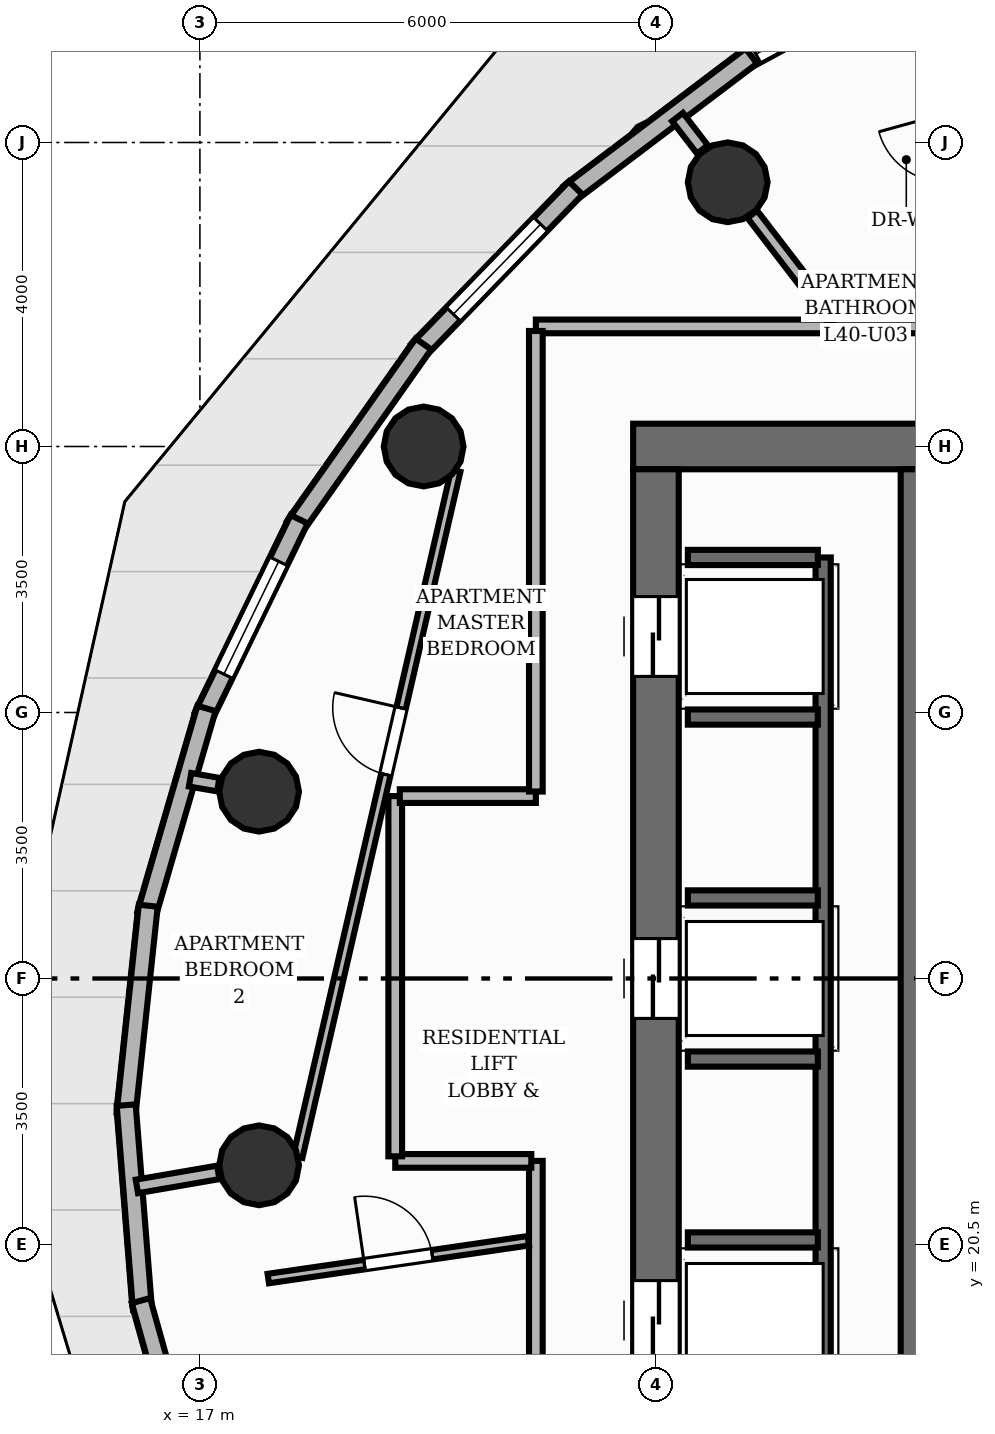
"""IFC4 building model, lengths in metres.
Left out: names, types, materials, properties, quantities, classifications, styles, units other than length and angle.
Written with IfcOpenShell. Run it as: python <this file> out.ifc"""

import sys

from ifc_helpers import new_model, si_unit, direction, frame, frame_2d, origin, origin_2d, place, context, subcontext, project, spatial, rectangle, circle, extrude, element, fill, save


model = new_model("IFC4")
c1 = context("Model", 3, precision=1e-05, world=origin(), true_north=direction((0.0, 1.0)))
c2 = subcontext(c1, "Body", "Model", "MODEL_VIEW")
j1 = project(units=[si_unit("LENGTHUNIT", "METRE"), si_unit("PLANEANGLEUNIT", "RADIAN")], contexts=[c1])
p1 = place(None, origin())
s1 = spatial("IfcSite", under=j1, at=p1, CompositionType="ELEMENT")
p2 = place(p1, origin())
s2 = spatial("IfcBuilding", under=s1, at=p2, CompositionType="ELEMENT")
p3 = place(p2, frame((0.0, 0.0, 136.16)))
s3 = spatial("IfcBuildingStorey", under=s2, at=p3, CompositionType="ELEMENT", Elevation=136.16)
p4 = place(p3, frame((22.7, 31.0, 0.0), z_axis=(0.0, 0.0, 1.0), x_axis=(1.0, 0.0, 0.0)))
e1 = element("IfcWall", 1, at=p4, inside=s3, PredefinedType="SHEAR", context=c2, shape_type="SweptSolid", body=[
    extrude(rectangle(XDim=15.1, YDim=0.6, at=frame_2d((7.55, 0.0))), origin(), (0.0, 0.0, 1.0), 3.2),
])
p5 = place(p4, frame((11.7, 0.0, 0.0)))
e2 = element("IfcOpeningElement", 2, at=p5, cuts=e1, PredefinedType="OPENING", context=c2, shape_type="SweptSolid", body=[
    extrude(rectangle(XDim=1.1, YDim=2.15, at=frame_2d((0.55, 1.075))), frame((0.0, 0.31, 0.0), z_axis=(0.0, -1.0, 0.0), x_axis=(1.0, 0.0, 0.0)), (0.0, 0.0, 1.0), 0.62),
])
p6 = place(p3, frame((23.0, 17.3, 0.0), z_axis=(0.0, 0.0, 1.0), x_axis=(0.0, 1.0, 0.0)))
e3 = element("IfcWall", 3, at=p6, inside=s3, PredefinedType="SHEAR", context=c2, shape_type="SweptSolid", body=[
    extrude(rectangle(XDim=13.4, YDim=0.6, at=frame_2d((6.7, 0.0))), origin(), (0.0, 0.0, 1.0), 3.2),
])
p7 = place(p6, frame((1.675, 0.0, 0.0)))
e4 = element("IfcOpeningElement", 4, at=p7, cuts=e3, PredefinedType="OPENING", context=c2, shape_type="SweptSolid", body=[
    extrude(rectangle(XDim=1.05, YDim=2.15, at=frame_2d((0.525, 1.075))), frame((0.0, 0.31, 0.0), z_axis=(0.0, -1.0, 0.0), x_axis=(1.0, 0.0, 0.0)), (0.0, 0.0, 1.0), 0.62),
])
p8 = place(p6, frame((6.175, 0.0, 0.0)))
e5 = element("IfcOpeningElement", 5, at=p8, cuts=e3, PredefinedType="OPENING", context=c2, shape_type="SweptSolid", body=[
    extrude(rectangle(XDim=1.05, YDim=2.15, at=frame_2d((0.525, 1.075))), frame((0.0, 0.31, 0.0), z_axis=(0.0, -1.0, 0.0), x_axis=(1.0, 0.0, 0.0)), (0.0, 0.0, 1.0), 0.62),
])
p9 = place(p6, frame((10.675, 0.0, 0.0)))
e6 = element("IfcOpeningElement", 6, at=p9, cuts=e3, PredefinedType="OPENING", context=c2, shape_type="SweptSolid", body=[
    extrude(rectangle(XDim=1.05, YDim=2.15, at=frame_2d((0.525, 1.075))), frame((0.0, 0.31, 0.0), z_axis=(0.0, -1.0, 0.0), x_axis=(1.0, 0.0, 0.0)), (0.0, 0.0, 1.0), 0.62),
])
p10 = place(p3, frame((26.5, 17.3, 0.0), z_axis=(0.0, 0.0, 1.0), x_axis=(0.0, 1.0, 0.0)))
e7 = element("IfcWall", 7, at=p10, inside=s3, PredefinedType="SHEAR", context=c2, shape_type="SweptSolid", body=[
    extrude(rectangle(XDim=13.4, YDim=0.56, at=frame_2d((6.7, 0.0))), origin(), (0.0, 0.0, 1.0), 3.2),
])
for number, where, z_axis, x_axis in (
    (8, (23.944, 34.477, 0.0), (0.0, 0.0, 1.0), (1.0, 0.0, 0.0)),
    (9, (19.944, 31.0, 0.0), (0.0, 0.0, 1.0), (1.0, 0.0, 0.0)),
    (10, (17.779, 26.458, 0.0), (0.0, 0.0, 1.0), (1.0, 0.0, 0.0)),
    (11, (17.779, 21.542, 0.0), (0.0, 0.0, 1.0), (1.0, 0.0, 0.0)),
):
    element("IfcColumn", number, at=place(p3, frame(where, z_axis=z_axis, x_axis=x_axis)), inside=s3, PredefinedType="COLUMN", context=c2, shape_type="SweptSolid", body=[
        extrude(circle(Radius=0.525, at=origin_2d()), origin(), (0.0, 0.0, 1.0), 3.2),
    ])
p11 = place(p3, frame((24.163, 36.079, 0.0), z_axis=(0.0, 0.0, 1.0), x_axis=(0.879567466611, 0.475774181393, 0.0)))
e12 = element("IfcWall", 12, at=p11, inside=s3, PredefinedType="SOLIDWALL", context=c2, shape_type="SweptSolid", body=[
    extrude(rectangle(XDim=2.998, YDim=0.25, at=frame_2d((1.499, 0.0))), origin(), (0.0, 0.0, 1.0), 2.96),
])
p12 = place(p11, frame((0.175, 0.0, 0.85)))
e13 = element("IfcOpeningElement", 13, at=p12, cuts=e12, PredefinedType="OPENING", context=c2, shape_type="SweptSolid", body=[
    extrude(rectangle(XDim=1.65, YDim=1.55, at=frame_2d((0.825, 0.775))), frame((0.0, 0.135, 0.0), z_axis=(0.0, -1.0, 0.0), x_axis=(1.0, 0.0, 0.0)), (0.0, 0.0, 1.0), 0.27),
])
p13 = place(p3, frame((21.863, 34.329, 0.0), z_axis=(0.0, 0.0, 1.0), x_axis=(0.797511213298, 0.603304122863, 0.0)))
e14 = element("IfcWall", 14, at=p13, inside=s3, PredefinedType="SOLIDWALL", context=c2, shape_type="SweptSolid", body=[
    extrude(rectangle(XDim=2.998, YDim=0.25, at=frame_2d((1.499, 0.0))), origin(), (0.0, 0.0, 1.0), 2.96),
])
p14 = place(p3, frame((19.872, 32.264, 0.0), z_axis=(0.0, 0.0, 1.0), x_axis=(0.696240605886, 0.717808483312, 0.0)))
e15 = element("IfcWall", 15, at=p14, inside=s3, PredefinedType="SOLIDWALL", context=c2, shape_type="SweptSolid", body=[
    extrude(rectangle(XDim=2.977, YDim=0.25, at=frame_2d((1.489, 0.0))), origin(), (0.0, 0.0, 1.0), 2.96),
])
p15 = place(p14, frame((0.664, 0.0, 0.85)))
e16 = element("IfcOpeningElement", 16, at=p15, cuts=e15, PredefinedType="OPENING", context=c2, shape_type="SweptSolid", body=[
    extrude(rectangle(XDim=1.65, YDim=1.55, at=frame_2d((0.825, 0.775))), frame((0.0, 0.135, 0.0), z_axis=(0.0, -1.0, 0.0), x_axis=(1.0, 0.0, 0.0)), (0.0, 0.0, 1.0), 0.27),
])
p16 = place(p3, frame((18.25, 29.948, 0.0), z_axis=(0.0, 0.0, 1.0), x_axis=(0.576020449187, 0.817435283137, 0.0)))
e17 = element("IfcWall", 17, at=p16, inside=s3, PredefinedType="SOLIDWALL", context=c2, shape_type="SweptSolid", body=[
    extrude(rectangle(XDim=2.937, YDim=0.25, at=frame_2d((1.468, 0.0))), origin(), (0.0, 0.0, 1.0), 2.96),
])
p17 = place(p3, frame((17.047, 27.45, 0.0), z_axis=(0.0, 0.0, 1.0), x_axis=(0.436882419805, 0.899518621967, 0.0)))
e18 = element("IfcWall", 18, at=p17, inside=s3, PredefinedType="SOLIDWALL", context=c2, shape_type="SweptSolid", body=[
    extrude(rectangle(XDim=2.882, YDim=0.25, at=frame_2d((1.441, 0.0))), origin(), (0.0, 0.0, 1.0), 2.96),
])
p18 = place(p17, frame((0.616, 0.0, 0.85)))
e19 = element("IfcOpeningElement", 19, at=p18, cuts=e18, PredefinedType="OPENING", context=c2, shape_type="SweptSolid", body=[
    extrude(rectangle(XDim=1.65, YDim=1.55, at=frame_2d((0.825, 0.775))), frame((0.0, 0.135, 0.0), z_axis=(0.0, -1.0, 0.0), x_axis=(1.0, 0.0, 0.0)), (0.0, 0.0, 1.0), 0.27),
])
p19 = place(p3, frame((16.299, 24.848, 0.0), z_axis=(0.0, 0.0, 1.0), x_axis=(0.27958078407, 0.960122172007, 0.0)))
e20 = element("IfcWall", 20, at=p19, inside=s3, PredefinedType="SOLIDWALL", context=c2, shape_type="SweptSolid", body=[
    extrude(rectangle(XDim=2.818, YDim=0.25, at=frame_2d((1.409, 0.0))), origin(), (0.0, 0.0, 1.0), 2.96),
])
p20 = place(p3, frame((16.029, 22.221, 0.0), z_axis=(0.0, 0.0, 1.0), x_axis=(0.106010014212, 0.994365062181, 0.0)))
e21 = element("IfcWall", 21, at=p20, inside=s3, PredefinedType="SOLIDWALL", context=c2, shape_type="SweptSolid", body=[
    extrude(rectangle(XDim=2.752, YDim=0.25, at=frame_2d((1.376, 0.0))), origin(), (0.0, 0.0, 1.0), 2.96),
])
p21 = place(p3, frame((16.244, 19.65, 0.0), z_axis=(0.0, 0.0, 1.0), x_axis=(-0.079420906371, 0.996841170714, 0.0)))
e22 = element("IfcWall", 22, at=p21, inside=s3, PredefinedType="SOLIDWALL", context=c2, shape_type="SweptSolid", body=[
    extrude(rectangle(XDim=2.693, YDim=0.25, at=frame_2d((1.346, 0.0))), origin(), (0.0, 0.0, 1.0), 2.96),
])
p22 = place(p3, frame((16.938, 17.211, 0.0), z_axis=(0.0, 0.0, 1.0), x_axis=(-0.269469206067, 0.963009006698, 0.0)))
e23 = element("IfcWall", 23, at=p22, inside=s3, PredefinedType="SOLIDWALL", context=c2, shape_type="SweptSolid", body=[
    extrude(rectangle(XDim=2.648, YDim=0.25, at=frame_2d((1.324, 0.0))), origin(), (0.0, 0.0, 1.0), 2.96),
])
p23 = place(p3, frame((25.2, 18.46, 0.0), z_axis=(0.0, 0.0, 1.0), x_axis=(0.0, 1.0, 0.0)))
e24 = element("IfcWall", 24, at=p23, inside=s3, PredefinedType="SHEAR", context=c2, shape_type="SweptSolid", body=[
    extrude(rectangle(XDim=11.08, YDim=0.2, at=frame_2d((5.54, 0.0))), origin(), (0.0, 0.0, 1.0), 3.2),
])
for number, where, z_axis, x_axis in (
    (25, (23.42, 29.54, 0.0), (0.0, 0.0, 1.0), (1.0, 0.0, 0.0)),
    (26, (23.42, 20.56, 0.0), (0.0, 0.0, 1.0), (1.0, 0.0, 0.0)),
    (27, (23.42, 22.94, 0.0), (0.0, 0.0, 1.0), (1.0, 0.0, 0.0)),
    (28, (23.42, 25.06, 0.0), (0.0, 0.0, 1.0), (1.0, 0.0, 0.0)),
    (29, (23.42, 27.44, 0.0), (0.0, 0.0, 1.0), (1.0, 0.0, 0.0)),
):
    element("IfcWall", number, at=place(p3, frame(where, z_axis=z_axis, x_axis=x_axis)), inside=s3, PredefinedType="SHEAR", context=c2, shape_type="SweptSolid", body=[
        extrude(rectangle(XDim=1.71, YDim=0.2, at=frame_2d((0.855, 0.0))), origin(), (0.0, 0.0, 1.0), 3.2),
    ])
p24 = place(p3, frame((23.612, 34.908, 0.0), z_axis=(0.0, 0.0, 1.0), x_axis=(-0.609469486836, 0.792809526063, 0.0)))
e30 = element("IfcWall", 30, at=p24, inside=s3, PredefinedType="PARTITIONING", context=c2, shape_type="SweptSolid", body=[
    extrude(rectangle(XDim=0.538, YDim=0.18, at=frame_2d((0.269, 0.0))), origin(), (0.0, 0.0, 1.0), 2.336),
])
p25 = place(p3, frame((17.242, 26.551, 0.0), z_axis=(0.0, 0.0, 1.0), x_axis=(-0.98535888436, 0.170493017491, 0.0)))
e31 = element("IfcWall", 31, at=p25, inside=s3, PredefinedType="PARTITIONING", context=c2, shape_type="SweptSolid", body=[
    extrude(rectangle(XDim=0.377, YDim=0.18, at=frame_2d((0.188, 0.0))), origin(), (0.0, 0.0, 1.0), 2.336),
])
p26 = place(p3, frame((17.242, 21.449, 0.0), z_axis=(0.0, 0.0, 1.0), x_axis=(-0.985361391556, -0.170478526599, 0.0)))
e32 = element("IfcWall", 32, at=p26, inside=s3, PredefinedType="PARTITIONING", context=c2, shape_type="SweptSolid", body=[
    extrude(rectangle(XDim=1.087, YDim=0.18, at=frame_2d((0.543, 0.0))), origin(), (0.0, 0.0, 1.0), 2.336),
])
p27 = place(p3, frame((21.42, 32.58, 0.0), z_axis=(0.0, 0.0, 1.0), x_axis=(1.0, 0.0, 0.0)))
e33 = element("IfcWall", 33, at=p27, inside=s3, PredefinedType="PARTITIONING", context=c2, shape_type="SweptSolid", body=[
    extrude(rectangle(XDim=11.105, YDim=0.18, at=frame_2d((5.552, 0.0))), origin(), (0.0, 0.0, 1.0), 2.955),
])
p28 = place(p27, frame((8.093, 0.0, 0.0)))
e34 = element("IfcOpeningElement", 34, at=p28, cuts=e33, PredefinedType="OPENING", context=c2, shape_type="SweptSolid", body=[
    extrude(rectangle(XDim=1.05, YDim=2.15, at=frame_2d((0.525, 1.075))), frame((0.0, 0.1, 0.0), z_axis=(0.0, -1.0, 0.0), x_axis=(1.0, 0.0, 0.0)), (0.0, 0.0, 1.0), 0.2),
])
p29 = place(p3, frame((21.42, 15.48, 0.0), z_axis=(0.0, 0.0, 1.0), x_axis=(0.0, 1.0, 0.0)))
e35 = element("IfcWall", 35, at=p29, inside=s3, PredefinedType="PARTITIONING", context=c2, shape_type="SweptSolid", body=[
    extrude(rectangle(XDim=6.12, YDim=0.18, at=frame_2d((3.06, 0.0))), origin(), (0.0, 0.0, 1.0), 2.955),
])
p30 = place(p29, frame((2.167, 0.0, 0.0)))
e36 = element("IfcOpeningElement", 36, at=p30, cuts=e35, PredefinedType="OPENING", context=c2, shape_type="SweptSolid", body=[
    extrude(rectangle(XDim=1.05, YDim=2.15, at=frame_2d((0.525, 1.075))), frame((0.0, 0.1, 0.0), z_axis=(0.0, -1.0, 0.0), x_axis=(1.0, 0.0, 0.0)), (0.0, 0.0, 1.0), 0.2),
])
p31 = place(p3, frame((21.36, 21.6, 0.0), z_axis=(0.0, 0.0, 1.0), x_axis=(-1.0, 0.0, 0.0)))
e37 = element("IfcWall", 37, at=p31, inside=s3, PredefinedType="PARTITIONING", context=c2, shape_type="SweptSolid", body=[
    extrude(rectangle(XDim=1.79, YDim=0.18, at=frame_2d((0.895, 0.0))), origin(), (0.0, 0.0, 1.0), 2.336),
])
p32 = place(p3, frame((19.57, 21.66, 0.0), z_axis=(0.0, 0.0, 1.0), x_axis=(0.0, 1.0, 0.0)))
e38 = element("IfcWall", 38, at=p32, inside=s3, PredefinedType="PARTITIONING", context=c2, shape_type="SweptSolid", body=[
    extrude(rectangle(XDim=4.74, YDim=0.18, at=frame_2d((2.37, 0.0))), origin(), (0.0, 0.0, 1.0), 2.955),
])
p33 = place(p3, frame((19.63, 26.4, 0.0), z_axis=(0.0, 0.0, 1.0), x_axis=(1.0, 0.0, 0.0)))
e39 = element("IfcWall", 39, at=p33, inside=s3, PredefinedType="PARTITIONING", context=c2, shape_type="SweptSolid", body=[
    extrude(rectangle(XDim=1.79, YDim=0.18, at=frame_2d((0.895, 0.0))), origin(), (0.0, 0.0, 1.0), 2.955),
])
p34 = place(p3, frame((21.42, 26.46, 0.0), z_axis=(0.0, 0.0, 1.0), x_axis=(0.0, 1.0, 0.0)))
e40 = element("IfcWall", 40, at=p34, inside=s3, PredefinedType="PARTITIONING", context=c2, shape_type="SweptSolid", body=[
    extrude(rectangle(XDim=6.06, YDim=0.18, at=frame_2d((3.03, 0.0))), origin(), (0.0, 0.0, 1.0), 2.955),
])
p35 = place(p3, frame((27.545, 32.677, 0.0), z_axis=(0.0, 0.0, 1.0), x_axis=(-0.265393905211, 0.964140070258, 0.0)))
e41 = element("IfcWall", 41, at=p35, inside=s3, PredefinedType="PLUMBINGWALL", context=c2, shape_type="SweptSolid", body=[
    extrude(rectangle(XDim=4.708, YDim=0.16, at=frame_2d((2.354, 0.0))), origin(), (0.0, 0.0, 1.0), 2.955),
])
p36 = place(p35, frame((1.904, 0.0, 0.0)))
e42 = element("IfcOpeningElement", 42, at=p36, cuts=e41, PredefinedType="OPENING", context=c2, shape_type="SweptSolid", body=[
    extrude(rectangle(XDim=0.9, YDim=2.1, at=frame_2d((0.45, 1.05))), frame((0.0, 0.09, 0.0), z_axis=(0.0, -1.0, 0.0), x_axis=(1.0, 0.0, 0.0)), (0.0, 0.0, 1.0), 0.18),
])
p37 = place(p3, frame((25.342, 32.659, 0.0), z_axis=(0.0, 0.0, 1.0), x_axis=(-0.609536601946, 0.792757927042, 0.0)))
e43 = element("IfcWall", 43, at=p37, inside=s3, PredefinedType="PLUMBINGWALL", context=c2, shape_type="SweptSolid", body=[
    extrude(rectangle(XDim=1.761, YDim=0.16, at=frame_2d((0.881, 0.0))), origin(), (0.0, 0.0, 1.0), 2.336),
])
p38 = place(p3, frame((17.899, 20.052, 0.0), z_axis=(0.0, 0.0, 1.0), x_axis=(0.989601977359, 0.143832980941, 0.0)))
e44 = element("IfcWall", 44, at=p38, inside=s3, PredefinedType="PARTITIONING", context=c2, shape_type="SweptSolid", body=[
    extrude(rectangle(XDim=3.458, YDim=0.125, at=frame_2d((1.729, 0.0))), origin(), (0.0, 0.0, 1.0), 2.692),
])
p39 = place(p38, frame((1.279, 0.0, 0.0)))
e45 = element("IfcOpeningElement", 45, at=p39, cuts=e44, PredefinedType="OPENING", context=c2, shape_type="SweptSolid", body=[
    extrude(rectangle(XDim=0.9, YDim=2.1, at=frame_2d((0.45, 1.05))), frame((0.0, 0.073, 0.0), z_axis=(0.0, -1.0, 0.0), x_axis=(1.0, 0.0, 0.0)), (0.0, 0.0, 1.0), 0.145),
])
p40 = place(p3, frame((18.287, 21.653, 0.0), z_axis=(0.0, 0.0, 1.0), x_axis=(0.2244032695, 0.974496368714, 0.0)))
e46 = element("IfcWall", 46, at=p40, inside=s3, PredefinedType="PARTITIONING", context=c2, shape_type="SweptSolid", body=[
    extrude(rectangle(XDim=9.263, YDim=0.125, at=frame_2d((4.631, 0.0))), origin(), (0.0, 0.0, 1.0), 2.955),
])
p41 = place(p40, frame((5.161, 0.0, 0.0)))
e47 = element("IfcOpeningElement", 47, at=p41, cuts=e46, PredefinedType="OPENING", context=c2, shape_type="SweptSolid", body=[
    extrude(rectangle(XDim=0.9, YDim=2.1, at=frame_2d((0.45, 1.05))), frame((0.0, 0.073, 0.0), z_axis=(0.0, -1.0, 0.0), x_axis=(1.0, 0.0, 0.0)), (0.0, 0.0, 1.0), 0.145),
])
p42 = place(p12, origin())
e48 = element("IfcWindow", 48, at=p42, inside=s3, PartitioningType="SINGLE_PANEL", PredefinedType="WINDOW", context=c2, shape_type="SweptSolid", body=[
    extrude(rectangle(XDim=1.65, YDim=1.55, at=frame_2d((0.825, 0.775))), frame((0.0, 0.03, 0.0), z_axis=(0.0, -1.0, 0.0), x_axis=(1.0, 0.0, 0.0)), (0.0, 0.0, 1.0), 0.06),
])
fill(e13, e48)
p43 = place(p15, origin())
e49 = element("IfcWindow", 49, at=p43, inside=s3, PartitioningType="SINGLE_PANEL", PredefinedType="WINDOW", context=c2, shape_type="SweptSolid", body=[
    extrude(rectangle(XDim=1.65, YDim=1.55, at=frame_2d((0.825, 0.775))), frame((0.0, 0.03, 0.0), z_axis=(0.0, -1.0, 0.0), x_axis=(1.0, 0.0, 0.0)), (0.0, 0.0, 1.0), 0.06),
])
fill(e16, e49)
p44 = place(p18, origin())
e50 = element("IfcWindow", 50, at=p44, inside=s3, PartitioningType="SINGLE_PANEL", PredefinedType="WINDOW", context=c2, shape_type="SweptSolid", body=[
    extrude(rectangle(XDim=1.65, YDim=1.55, at=frame_2d((0.825, 0.775))), frame((0.0, 0.03, 0.0), z_axis=(0.0, -1.0, 0.0), x_axis=(1.0, 0.0, 0.0)), (0.0, 0.0, 1.0), 0.06),
])
fill(e19, e50)
p45 = place(p7, origin())
e51 = element("IfcDoor", 51, at=p45, inside=s3, OperationType="DOUBLE_DOOR_SLIDING", PredefinedType="DOOR", context=c2, shape_type="SweptSolid", body=[
    extrude(rectangle(XDim=1.05, YDim=2.15, at=frame_2d((0.525, 1.075))), frame((0.0, 0.025, 0.0), z_axis=(0.0, -1.0, 0.0), x_axis=(1.0, 0.0, 0.0)), (0.0, 0.0, 1.0), 0.05),
])
fill(e4, e51)
p46 = place(p8, origin())
e52 = element("IfcDoor", 52, at=p46, inside=s3, OperationType="DOUBLE_DOOR_SLIDING", PredefinedType="DOOR", context=c2, shape_type="SweptSolid", body=[
    extrude(rectangle(XDim=1.05, YDim=2.15, at=frame_2d((0.525, 1.075))), frame((0.0, 0.025, 0.0), z_axis=(0.0, -1.0, 0.0), x_axis=(1.0, 0.0, 0.0)), (0.0, 0.0, 1.0), 0.05),
])
fill(e5, e52)
p47 = place(p9, origin())
e53 = element("IfcDoor", 53, at=p47, inside=s3, OperationType="DOUBLE_DOOR_SLIDING", PredefinedType="DOOR", context=c2, shape_type="SweptSolid", body=[
    extrude(rectangle(XDim=1.05, YDim=2.15, at=frame_2d((0.525, 1.075))), frame((0.0, 0.025, 0.0), z_axis=(0.0, -1.0, 0.0), x_axis=(1.0, 0.0, 0.0)), (0.0, 0.0, 1.0), 0.05),
])
fill(e6, e53)
p48 = place(p39, origin())
e54 = element("IfcDoor", 54, at=p48, inside=s3, OperationType="SINGLE_SWING_LEFT", PredefinedType="DOOR", context=c2, shape_type="SweptSolid", body=[
    extrude(rectangle(XDim=0.9, YDim=2.1, at=frame_2d((0.45, 1.05))), frame((0.0, 0.025, 0.0), z_axis=(0.0, -1.0, 0.0), x_axis=(1.0, 0.0, 0.0)), (0.0, 0.0, 1.0), 0.05),
])
fill(e45, e54)
p49 = place(p41, origin())
e55 = element("IfcDoor", 55, at=p49, inside=s3, OperationType="SINGLE_SWING_RIGHT", PredefinedType="DOOR", context=c2, shape_type="SweptSolid", body=[
    extrude(rectangle(XDim=0.9, YDim=2.1, at=frame_2d((0.45, 1.05))), frame((0.0, 0.025, 0.0), z_axis=(0.0, -1.0, 0.0), x_axis=(1.0, 0.0, 0.0)), (0.0, 0.0, 1.0), 0.05),
])
fill(e47, e55)
save(model, sys.argv[1])
